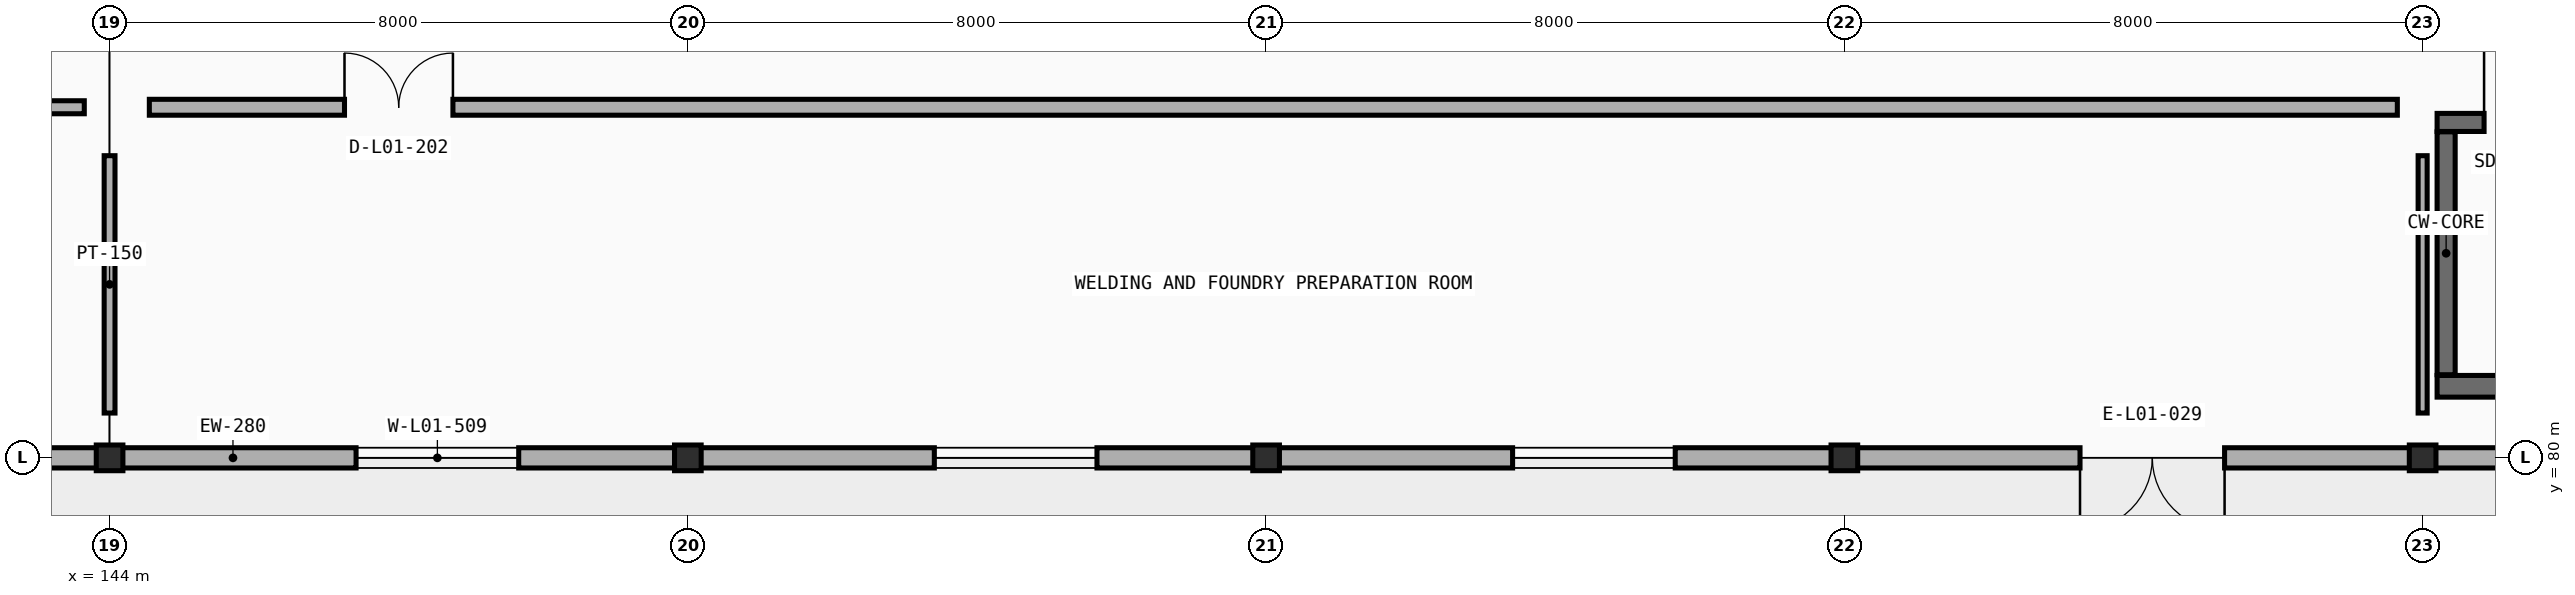
"""IFC4 building model, lengths in metres.
Left out: names, types, materials, properties, quantities, classifications, styles, units other than length and angle.
Written with IfcOpenShell. Run it as: python <this file> out.ifc"""

import sys

from ifc_helpers import new_model, si_unit, direction, frame, frame_2d, origin, origin_2d, place, context, subcontext, project, spatial, rectangle, i_section, extrude, element, fill, save


model = new_model("IFC4")
c1 = context("Model", 3, precision=1e-05, world=origin(), true_north=direction((0.0, 1.0)))
c2 = subcontext(c1, "Body", "Model", "MODEL_VIEW")
j1 = project(units=[si_unit("LENGTHUNIT", "METRE"), si_unit("PLANEANGLEUNIT", "RADIAN")], contexts=[c1])
p1 = place(None, origin())
s1 = spatial("IfcSite", under=j1, at=p1, CompositionType="ELEMENT")
p2 = place(p1, origin())
s2 = spatial("IfcBuilding", under=s1, at=p2, CompositionType="ELEMENT")
p3 = place(p2, origin())
s3 = spatial("IfcBuildingStorey", under=s2, at=p3, CompositionType="ELEMENT", Elevation=0.0)
for number, where, z_axis, x_axis in (
    (1, (144.0, 80.0, 0.0), (0.0, 0.0, 1.0), (1.0, 0.0, 0.0)),
    (2, (152.0, 80.0, 0.0), (0.0, 0.0, 1.0), (1.0, 0.0, 0.0)),
    (3, (160.0, 80.0, 0.0), (0.0, 0.0, 1.0), (1.0, 0.0, 0.0)),
    (4, (168.0, 80.0, 0.0), (0.0, 0.0, 1.0), (1.0, 0.0, 0.0)),
    (5, (176.0, 80.0, 0.0), (0.0, 0.0, 1.0), (1.0, 0.0, 0.0)),
):
    element("IfcColumn", number, at=place(p3, frame(where, z_axis=z_axis, x_axis=x_axis)), inside=s3, PredefinedType="COLUMN", context=c2, shape_type="SweptSolid", body=[
        extrude(i_section(OverallWidth=0.369, OverallDepth=0.356, WebThickness=0.01, FlangeThickness=0.018, FilletRadius=0.015, at=origin_2d()), origin(), (0.0, 0.0, 1.0), 4.8),
    ])
p4 = place(p3, frame((143.996, 80.0, 0.0), z_axis=(0.0, 0.0, 1.0), x_axis=(-1.0, 0.0, 0.0)))
e6 = element("IfcWall", 6, at=p4, inside=s3, PredefinedType="STANDARD", context=c2, shape_type="SweptSolid", body=[
    extrude(rectangle(XDim=7.992, YDim=0.28, at=frame_2d((3.996, 0.0))), origin(), (0.0, 0.0, 1.0), 3.895),
])
p5 = place(p4, frame((2.736, 0.0, 0.0)))
e7 = element("IfcOpeningElement", 7, at=p5, cuts=e6, PredefinedType="OPENING", context=c2, shape_type="SweptSolid", body=[
    extrude(rectangle(XDim=2.0, YDim=2.4, at=frame_2d((1.0, 1.2))), frame((0.0, 0.15, 0.0), z_axis=(0.0, -1.0, 0.0), x_axis=(1.0, 0.0, 0.0)), (0.0, 0.0, 1.0), 0.3),
])
p6 = place(p3, frame((151.996, 80.0, 0.0), z_axis=(0.0, 0.0, 1.0), x_axis=(-1.0, 0.0, 0.0)))
e8 = element("IfcWall", 8, at=p6, inside=s3, PredefinedType="STANDARD", context=c2, shape_type="SweptSolid", body=[
    extrude(rectangle(XDim=7.992, YDim=0.28, at=frame_2d((3.996, 0.0))), origin(), (0.0, 0.0, 1.0), 3.895),
])
p7 = place(p6, frame((2.336, 0.0, 0.95)))
e9 = element("IfcOpeningElement", 9, at=p7, cuts=e8, PredefinedType="OPENING", context=c2, shape_type="SweptSolid", body=[
    extrude(rectangle(XDim=2.25, YDim=2.0, at=frame_2d((1.125, 1.0))), frame((0.0, 0.15, 0.0), z_axis=(0.0, -1.0, 0.0), x_axis=(1.0, 0.0, 0.0)), (0.0, 0.0, 1.0), 0.3),
])
p8 = place(p3, frame((159.996, 80.0, 0.0), z_axis=(0.0, 0.0, 1.0), x_axis=(-1.0, 0.0, 0.0)))
e10 = element("IfcWall", 10, at=p8, inside=s3, PredefinedType="STANDARD", context=c2, shape_type="SweptSolid", body=[
    extrude(rectangle(XDim=7.992, YDim=0.28, at=frame_2d((3.996, 0.0))), origin(), (0.0, 0.0, 1.0), 3.895),
])
p9 = place(p8, frame((2.336, 0.0, 0.95)))
e11 = element("IfcOpeningElement", 11, at=p9, cuts=e10, PredefinedType="OPENING", context=c2, shape_type="SweptSolid", body=[
    extrude(rectangle(XDim=2.25, YDim=2.0, at=frame_2d((1.125, 1.0))), frame((0.0, 0.15, 0.0), z_axis=(0.0, -1.0, 0.0), x_axis=(1.0, 0.0, 0.0)), (0.0, 0.0, 1.0), 0.3),
])
p10 = place(p3, frame((167.996, 80.0, 0.0), z_axis=(0.0, 0.0, 1.0), x_axis=(-1.0, 0.0, 0.0)))
e12 = element("IfcWall", 12, at=p10, inside=s3, PredefinedType="STANDARD", context=c2, shape_type="SweptSolid", body=[
    extrude(rectangle(XDim=7.992, YDim=0.28, at=frame_2d((3.996, 0.0))), origin(), (0.0, 0.0, 1.0), 3.895),
])
p11 = place(p10, frame((2.336, 0.0, 0.95)))
e13 = element("IfcOpeningElement", 13, at=p11, cuts=e12, PredefinedType="OPENING", context=c2, shape_type="SweptSolid", body=[
    extrude(rectangle(XDim=2.25, YDim=2.0, at=frame_2d((1.125, 1.0))), frame((0.0, 0.15, 0.0), z_axis=(0.0, -1.0, 0.0), x_axis=(1.0, 0.0, 0.0)), (0.0, 0.0, 1.0), 0.3),
])
p12 = place(p3, frame((175.996, 80.0, 0.0), z_axis=(0.0, 0.0, 1.0), x_axis=(-1.0, 0.0, 0.0)))
e14 = element("IfcWall", 14, at=p12, inside=s3, PredefinedType="STANDARD", context=c2, shape_type="SweptSolid", body=[
    extrude(rectangle(XDim=7.992, YDim=0.28, at=frame_2d((3.996, 0.0))), origin(), (0.0, 0.0, 1.0), 3.895),
])
p13 = place(p12, frame((2.736, 0.0, 0.0)))
e15 = element("IfcOpeningElement", 15, at=p13, cuts=e14, PredefinedType="OPENING", context=c2, shape_type="SweptSolid", body=[
    extrude(rectangle(XDim=2.0, YDim=2.4, at=frame_2d((1.0, 1.2))), frame((0.0, 0.15, 0.0), z_axis=(0.0, -1.0, 0.0), x_axis=(1.0, 0.0, 0.0)), (0.0, 0.0, 1.0), 0.3),
])
p14 = place(p3, frame((183.996, 80.0, 0.0), z_axis=(0.0, 0.0, 1.0), x_axis=(-1.0, 0.0, 0.0)))
e16 = element("IfcWall", 16, at=p14, inside=s3, PredefinedType="STANDARD", context=c2, shape_type="SweptSolid", body=[
    extrude(rectangle(XDim=7.992, YDim=0.28, at=frame_2d((3.996, 0.0))), origin(), (0.0, 0.0, 1.0), 3.895),
])
p15 = place(p14, frame((2.336, 0.0, 0.95)))
e17 = element("IfcOpeningElement", 17, at=p15, cuts=e16, PredefinedType="OPENING", context=c2, shape_type="SweptSolid", body=[
    extrude(rectangle(XDim=2.25, YDim=2.0, at=frame_2d((1.125, 1.0))), frame((0.0, 0.15, 0.0), z_axis=(0.0, -1.0, 0.0), x_axis=(1.0, 0.0, 0.0)), (0.0, 0.0, 1.0), 0.3),
])
p16 = place(p3, frame((176.2, 80.99, 0.0), z_axis=(0.0, 0.0, 1.0), x_axis=(1.0, 0.0, 0.0)))
e18 = element("IfcWall", 18, at=p16, inside=s3, PredefinedType="SHEAR", context=c2, shape_type="SweptSolid", body=[
    extrude(rectangle(XDim=7.65, YDim=0.3, at=frame_2d((3.825, 0.0))), origin(), (0.0, 0.0, 1.0), 4.8),
])
p17 = place(p3, frame((176.2, 84.64, 0.0), z_axis=(0.0, 0.0, 1.0), x_axis=(1.0, 0.0, 0.0)))
e19 = element("IfcWall", 19, at=p17, inside=s3, PredefinedType="SOLIDWALL", context=c2, shape_type="SweptSolid", body=[
    extrude(rectangle(XDim=7.65, YDim=0.25, at=frame_2d((3.825, 0.0))), origin(), (0.0, 0.0, 1.0), 4.8),
])
p18 = place(p17, frame((0.65, 0.0, 0.0)))
e20 = element("IfcOpeningElement", 20, at=p18, cuts=e19, PredefinedType="OPENING", context=c2, shape_type="SweptSolid", body=[
    extrude(rectangle(XDim=1.25, YDim=2.15, at=frame_2d((0.625, 1.075))), frame((0.0, 0.135, 0.0), z_axis=(0.0, -1.0, 0.0), x_axis=(1.0, 0.0, 0.0)), (0.0, 0.0, 1.0), 0.27),
])
p19 = place(p3, frame((176.325, 81.15, 0.0), z_axis=(0.0, 0.0, 1.0), x_axis=(0.0, 1.0, 0.0)))
e21 = element("IfcWall", 21, at=p19, inside=s3, PredefinedType="SOLIDWALL", context=c2, shape_type="SweptSolid", body=[
    extrude(rectangle(XDim=3.36, YDim=0.25, at=frame_2d((1.68, 0.0))), origin(), (0.0, 0.0, 1.0), 4.8),
])
p20 = place(p3, frame((112.35, 84.85, 0.0), z_axis=(0.0, 0.0, 1.0), x_axis=(1.0, 0.0, 0.0)))
e22 = element("IfcWall", 22, at=p20, inside=s3, PredefinedType="PARTITIONING", context=c2, shape_type="SweptSolid", body=[
    extrude(rectangle(XDim=31.3, YDim=0.18, at=frame_2d((15.65, 0.0))), origin(), (0.0, 0.0, 1.0), 3.9),
])
p21 = place(p20, frame((2.93, 0.0, 0.0)))
e23 = element("IfcOpeningElement", 23, at=p21, cuts=e22, PredefinedType="OPENING", context=c2, shape_type="SweptSolid", body=[
    extrude(rectangle(XDim=1.44, YDim=2.2, at=frame_2d((0.72, 1.1))), frame((0.0, 0.1, 0.0), z_axis=(0.0, -1.0, 0.0), x_axis=(1.0, 0.0, 0.0)), (0.0, 0.0, 1.0), 0.2),
])
p22 = place(p3, frame((144.0, 80.62, 0.0), z_axis=(0.0, 0.0, 1.0), x_axis=(0.0, 1.0, 0.0)))
e24 = element("IfcWall", 24, at=p22, inside=s3, PredefinedType="PARTITIONING", context=c2, shape_type="SweptSolid", body=[
    extrude(rectangle(XDim=3.56, YDim=0.15, at=frame_2d((1.78, 0.0))), origin(), (0.0, 0.0, 1.0), 3.745),
])
p23 = place(p3, frame((144.55, 84.85, 0.0), z_axis=(0.0, 0.0, 1.0), x_axis=(1.0, 0.0, 0.0)))
e25 = element("IfcWall", 25, at=p23, inside=s3, PredefinedType="PARTITIONING", context=c2, shape_type="SweptSolid", body=[
    extrude(rectangle(XDim=31.1, YDim=0.22, at=frame_2d((15.55, 0.0))), origin(), (0.0, 0.0, 1.0), 3.9),
])
p24 = place(p23, frame((2.7, 0.0, 0.0)))
e26 = element("IfcOpeningElement", 26, at=p24, cuts=e25, PredefinedType="OPENING", context=c2, shape_type="SweptSolid", body=[
    extrude(rectangle(XDim=1.5, YDim=2.2, at=frame_2d((0.75, 1.1))), frame((0.0, 0.12, 0.0), z_axis=(0.0, -1.0, 0.0), x_axis=(1.0, 0.0, 0.0)), (0.0, 0.0, 1.0), 0.24),
])
p25 = place(p3, frame((176.0, 80.62, 0.0), z_axis=(0.0, 0.0, 1.0), x_axis=(0.0, 1.0, 0.0)))
e27 = element("IfcWall", 27, at=p25, inside=s3, PredefinedType="PARTITIONING", context=c2, shape_type="SweptSolid", body=[
    extrude(rectangle(XDim=3.56, YDim=0.125, at=frame_2d((1.78, 0.0))), origin(), (0.0, 0.0, 1.0), 3.745),
])
p26 = place(p7, origin())
e28 = element("IfcWindow", 28, at=p26, inside=s3, PartitioningType="DOUBLE_PANEL_VERTICAL", PredefinedType="WINDOW", context=c2, shape_type="SweptSolid", body=[
    extrude(rectangle(XDim=2.25, YDim=2.0, at=frame_2d((1.125, 1.0))), frame((0.0, 0.03, 0.0), z_axis=(0.0, -1.0, 0.0), x_axis=(1.0, 0.0, 0.0)), (0.0, 0.0, 1.0), 0.06),
])
fill(e9, e28)
p27 = place(p9, origin())
e29 = element("IfcWindow", 29, at=p27, inside=s3, PartitioningType="DOUBLE_PANEL_VERTICAL", PredefinedType="WINDOW", context=c2, shape_type="SweptSolid", body=[
    extrude(rectangle(XDim=2.25, YDim=2.0, at=frame_2d((1.125, 1.0))), frame((0.0, 0.03, 0.0), z_axis=(0.0, -1.0, 0.0), x_axis=(1.0, 0.0, 0.0)), (0.0, 0.0, 1.0), 0.06),
])
fill(e11, e29)
p28 = place(p11, origin())
e30 = element("IfcWindow", 30, at=p28, inside=s3, PartitioningType="DOUBLE_PANEL_VERTICAL", PredefinedType="WINDOW", context=c2, shape_type="SweptSolid", body=[
    extrude(rectangle(XDim=2.25, YDim=2.0, at=frame_2d((1.125, 1.0))), frame((0.0, 0.03, 0.0), z_axis=(0.0, -1.0, 0.0), x_axis=(1.0, 0.0, 0.0)), (0.0, 0.0, 1.0), 0.06),
])
fill(e13, e30)
p29 = place(p13, origin())
e31 = element("IfcDoor", 31, at=p29, inside=s3, OperationType="DOUBLE_DOOR_SINGLE_SWING", PredefinedType="DOOR", context=c2, shape_type="SweptSolid", body=[
    extrude(rectangle(XDim=2.0, YDim=2.4, at=frame_2d((1.0, 1.2))), frame((0.0, 0.025, 0.0), z_axis=(0.0, -1.0, 0.0), x_axis=(1.0, 0.0, 0.0)), (0.0, 0.0, 1.0), 0.05),
])
fill(e15, e31)
p30 = place(p18, origin())
e32 = element("IfcDoor", 32, at=p30, inside=s3, OperationType="SINGLE_SWING_LEFT", PredefinedType="DOOR", context=c2, shape_type="SweptSolid", body=[
    extrude(rectangle(XDim=1.25, YDim=2.15, at=frame_2d((0.625, 1.075))), frame((0.0, 0.025, 0.0), z_axis=(0.0, -1.0, 0.0), x_axis=(1.0, 0.0, 0.0)), (0.0, 0.0, 1.0), 0.05),
])
fill(e20, e32)
p31 = place(p24, origin())
e33 = element("IfcDoor", 33, at=p31, inside=s3, OperationType="DOUBLE_DOOR_SINGLE_SWING", PredefinedType="DOOR", context=c2, shape_type="SweptSolid", body=[
    extrude(rectangle(XDim=1.5, YDim=2.2, at=frame_2d((0.75, 1.1))), frame((0.0, 0.025, 0.0), z_axis=(0.0, -1.0, 0.0), x_axis=(1.0, 0.0, 0.0)), (0.0, 0.0, 1.0), 0.05),
])
fill(e26, e33)
save(model, sys.argv[1])
